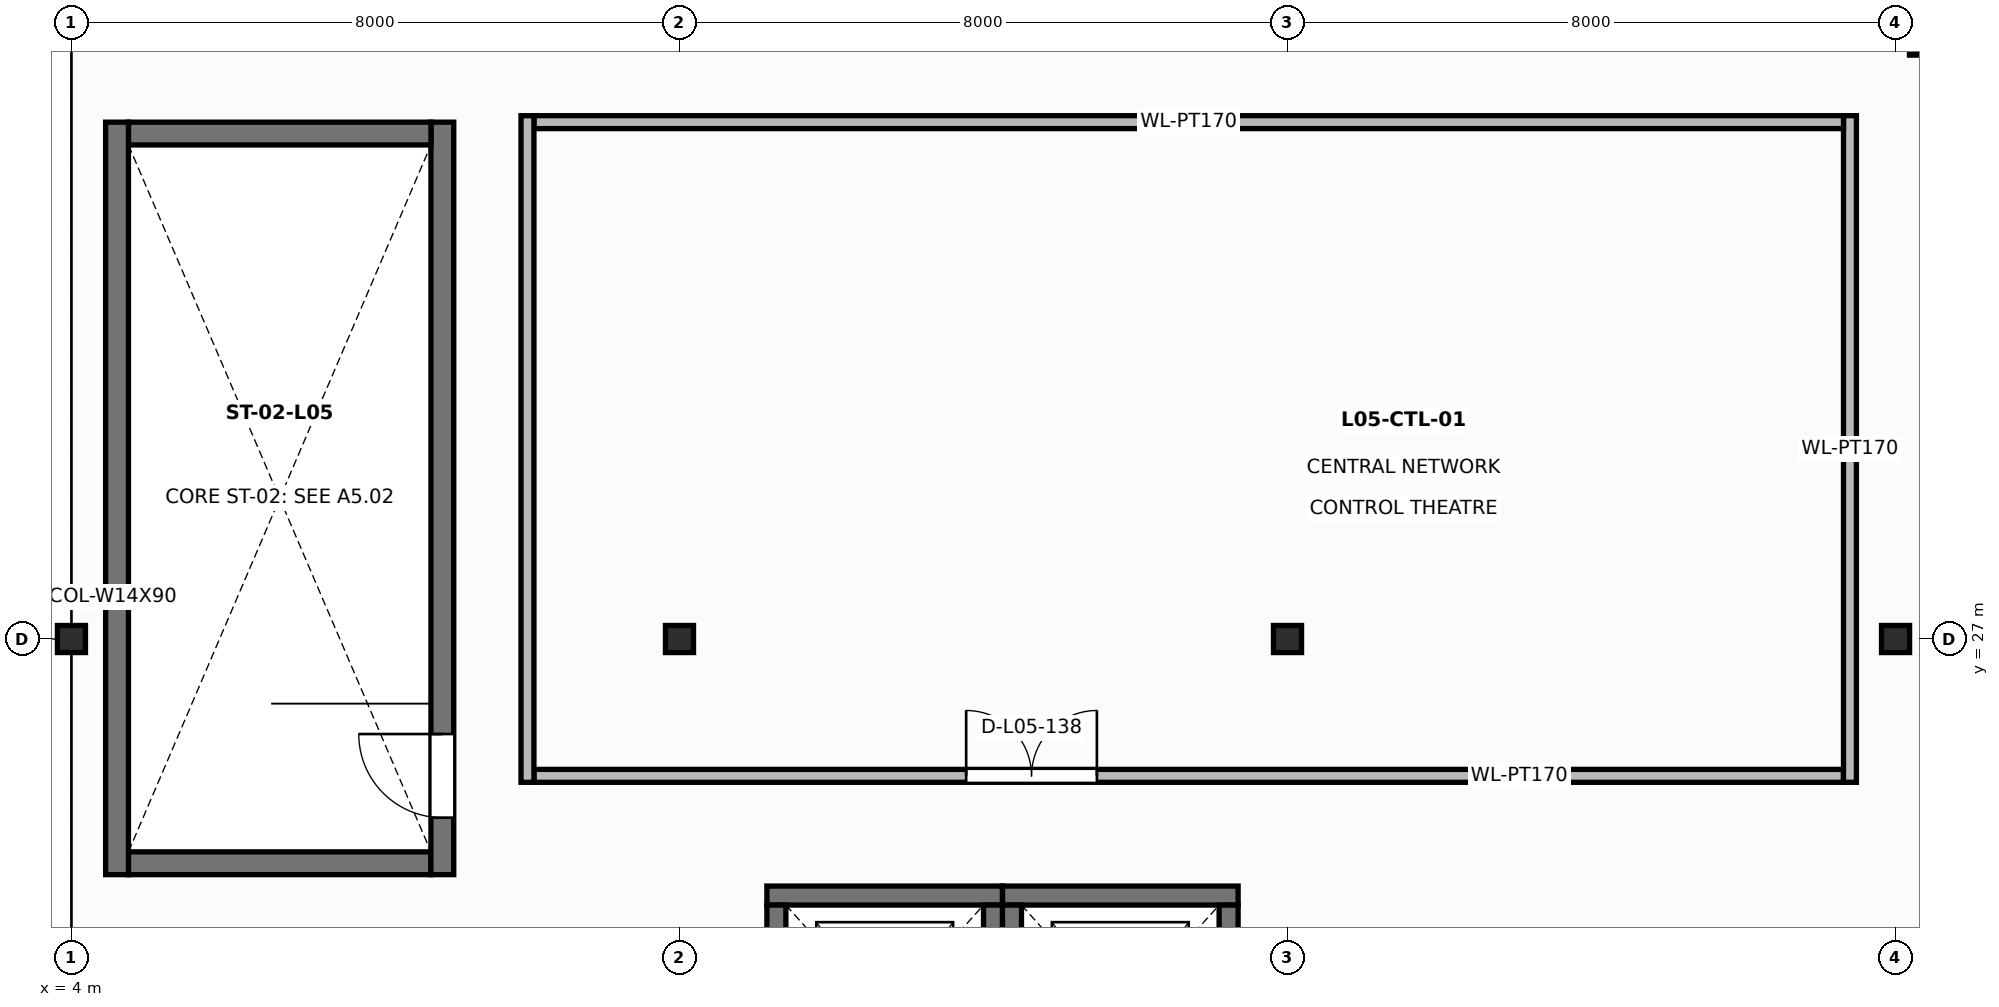
"""IFC4 building model, lengths in metres.
Left out: names, types, materials, properties, quantities, classifications, styles, units other than length and angle.
Written with IfcOpenShell. Run it as: python <this file> out.ifc"""

import sys

from ifc_helpers import new_model, si_unit, direction, frame, frame_2d, origin, origin_2d, place, context, subcontext, project, spatial, rectangle, i_section, extrude, element, fill, save


model = new_model("IFC4")
c1 = context("Model", 3, precision=1e-05, world=origin(), true_north=direction((0.0, 1.0)))
c2 = subcontext(c1, "Body", "Model", "MODEL_VIEW")
j1 = project(units=[si_unit("LENGTHUNIT", "METRE"), si_unit("PLANEANGLEUNIT", "RADIAN")], contexts=[c1])
p1 = place(None, origin())
s1 = spatial("IfcSite", under=j1, at=p1, CompositionType="ELEMENT")
p2 = place(p1, origin())
s2 = spatial("IfcBuilding", under=s1, at=p2, CompositionType="ELEMENT")
p3 = place(p2, frame((0.0, 0.0, 24.0)))
s3 = spatial("IfcBuildingStorey", under=s2, at=p3, CompositionType="ELEMENT", Elevation=24.0)
for number, where, z_axis, x_axis in (
    (1, (4.0, 27.0, 0.0), (0.0, 0.0, 1.0), (1.0, 0.0, 0.0)),
    (2, (12.0, 27.0, 0.0), (0.0, 0.0, 1.0), (1.0, 0.0, 0.0)),
    (3, (20.0, 27.0, 0.0), (0.0, 0.0, 1.0), (1.0, 0.0, 0.0)),
    (4, (28.0, 27.0, 0.0), (0.0, 0.0, 1.0), (1.0, 0.0, 0.0)),
):
    element("IfcColumn", number, at=place(p3, frame(where, z_axis=z_axis, x_axis=x_axis)), inside=s3, PredefinedType="COLUMN", context=c2, shape_type="SweptSolid", body=[
        extrude(i_section(OverallWidth=0.369, OverallDepth=0.356, WebThickness=0.011, FlangeThickness=0.018, at=origin_2d()), origin(), (0.0, 0.0, 1.0), 4.0),
    ])
p4 = place(p3, frame((4.75, 24.05, 0.0), z_axis=(0.0, 0.0, 1.0), x_axis=(1.0, 0.0, 0.0)))
e5 = element("IfcWall", 5, at=p4, inside=s3, PredefinedType="SHEAR", context=c2, shape_type="SweptSolid", body=[
    extrude(rectangle(XDim=3.98, YDim=0.3, at=frame_2d((1.99, 0.0))), origin(), (0.0, 0.0, 1.0), 3.6),
])
p5 = place(p3, frame((8.88, 23.9, 0.0), z_axis=(0.0, 0.0, 1.0), x_axis=(0.0, 1.0, 0.0)))
e6 = element("IfcWall", 6, at=p5, inside=s3, PredefinedType="SHEAR", context=c2, shape_type="SweptSolid", body=[
    extrude(rectangle(XDim=9.9, YDim=0.3, at=frame_2d((4.95, 0.0))), origin(), (0.0, 0.0, 1.0), 3.6),
])
p6 = place(p5, frame((0.75, 0.0, 0.0)))
e7 = element("IfcOpeningElement", 7, at=p6, cuts=e6, PredefinedType="OPENING", context=c2, shape_type="SweptSolid", body=[
    extrude(rectangle(XDim=1.1, YDim=2.15, at=frame_2d((0.55, 1.075))), frame((0.0, 0.16, 0.0), z_axis=(0.0, -1.0, 0.0), x_axis=(1.0, 0.0, 0.0)), (0.0, 0.0, 1.0), 0.32),
])
p7 = place(p3, frame((8.73, 33.65, 0.0), z_axis=(0.0, 0.0, 1.0), x_axis=(-1.0, 0.0, 0.0)))
e8 = element("IfcWall", 8, at=p7, inside=s3, PredefinedType="SHEAR", context=c2, shape_type="SweptSolid", body=[
    extrude(rectangle(XDim=3.98, YDim=0.3, at=frame_2d((1.99, 0.0))), origin(), (0.0, 0.0, 1.0), 3.6),
])
p8 = place(p3, frame((4.6, 33.8, 0.0), z_axis=(0.0, 0.0, 1.0), x_axis=(0.0, -1.0, 0.0)))
e9 = element("IfcWall", 9, at=p8, inside=s3, PredefinedType="SHEAR", context=c2, shape_type="SweptSolid", body=[
    extrude(rectangle(XDim=9.9, YDim=0.3, at=frame_2d((4.95, 0.0))), origin(), (0.0, 0.0, 1.0), 3.6),
])
p9 = place(p3, frame((16.25, 23.625, 0.0), z_axis=(0.0, 0.0, 1.0), x_axis=(-1.0, 0.0, 0.0)))
e10 = element("IfcWall", 10, at=p9, inside=s3, PredefinedType="SOLIDWALL", context=c2, shape_type="SweptSolid", body=[
    extrude(rectangle(XDim=3.1, YDim=0.25, at=frame_2d((1.55, 0.0))), origin(), (0.0, 0.0, 1.0), 3.35),
])
for number, where, z_axis, x_axis in (
    (11, (16.125, 20.6, 0.0), (0.0, 0.0, 1.0), (0.0, 1.0, 0.0)),
    (12, (13.275, 23.5, 0.0), (0.0, 0.0, 1.0), (0.0, -1.0, 0.0)),
):
    element("IfcWall", number, at=place(p3, frame(where, z_axis=z_axis, x_axis=x_axis)), inside=s3, PredefinedType="SOLIDWALL", context=c2, shape_type="SweptSolid", body=[
        extrude(rectangle(XDim=2.9, YDim=0.25, at=frame_2d((1.45, 0.0))), origin(), (0.0, 0.0, 1.0), 3.35),
    ])
p10 = place(p3, frame((19.35, 23.625, 0.0), z_axis=(0.0, 0.0, 1.0), x_axis=(-1.0, 0.0, 0.0)))
e13 = element("IfcWall", 13, at=p10, inside=s3, PredefinedType="SOLIDWALL", context=c2, shape_type="SweptSolid", body=[
    extrude(rectangle(XDim=3.1, YDim=0.25, at=frame_2d((1.55, 0.0))), origin(), (0.0, 0.0, 1.0), 3.35),
])
for number, where, z_axis, x_axis in (
    (14, (19.225, 20.6, 0.0), (0.0, 0.0, 1.0), (0.0, 1.0, 0.0)),
    (15, (16.375, 23.5, 0.0), (0.0, 0.0, 1.0), (0.0, -1.0, 0.0)),
):
    element("IfcWall", number, at=place(p3, frame(where, z_axis=z_axis, x_axis=x_axis)), inside=s3, PredefinedType="SOLIDWALL", context=c2, shape_type="SweptSolid", body=[
        extrude(rectangle(XDim=2.9, YDim=0.25, at=frame_2d((1.45, 0.0))), origin(), (0.0, 0.0, 1.0), 3.35),
    ])
p11 = place(p3, frame((10.085, 25.2, 0.0), z_axis=(0.0, 0.0, 1.0), x_axis=(1.0, 0.0, 0.0)))
e16 = element("IfcWall", 16, at=p11, inside=s3, PredefinedType="PARTITIONING", context=c2, shape_type="SweptSolid", body=[
    extrude(rectangle(XDim=17.23, YDim=0.17, at=frame_2d((8.615, 0.0))), origin(), (0.0, 0.0, 1.0), 3.6),
])
p12 = place(p11, frame((5.687, 0.0, 0.0)))
e17 = element("IfcOpeningElement", 17, at=p12, cuts=e16, PredefinedType="OPENING", context=c2, shape_type="SweptSolid", body=[
    extrude(rectangle(XDim=1.72, YDim=2.25, at=frame_2d((0.86, 1.125))), frame((0.0, 0.095, 0.0), z_axis=(0.0, -1.0, 0.0), x_axis=(1.0, 0.0, 0.0)), (0.0, 0.0, 1.0), 0.19),
])
p13 = place(p3, frame((27.4, 25.115, 0.0), z_axis=(0.0, 0.0, 1.0), x_axis=(0.0, 1.0, 0.0)))
e18 = element("IfcWall", 18, at=p13, inside=s3, PredefinedType="PARTITIONING", context=c2, shape_type="SweptSolid", body=[
    extrude(rectangle(XDim=8.77, YDim=0.17, at=frame_2d((4.385, 0.0))), origin(), (0.0, 0.0, 1.0), 3.6),
])
p14 = place(p3, frame((27.315, 33.8, 0.0), z_axis=(0.0, 0.0, 1.0), x_axis=(-1.0, 0.0, 0.0)))
e19 = element("IfcWall", 19, at=p14, inside=s3, PredefinedType="PARTITIONING", context=c2, shape_type="SweptSolid", body=[
    extrude(rectangle(XDim=17.23, YDim=0.17, at=frame_2d((8.615, 0.0))), origin(), (0.0, 0.0, 1.0), 3.6),
])
p15 = place(p3, frame((10.0, 33.885, 0.0), z_axis=(0.0, 0.0, 1.0), x_axis=(0.0, -1.0, 0.0)))
e20 = element("IfcWall", 20, at=p15, inside=s3, PredefinedType="PARTITIONING", context=c2, shape_type="SweptSolid", body=[
    extrude(rectangle(XDim=8.77, YDim=0.17, at=frame_2d((4.385, 0.0))), origin(), (0.0, 0.0, 1.0), 3.6),
])
p16 = place(p6, origin())
e21 = element("IfcDoor", 21, at=p16, inside=s3, OperationType="SINGLE_SWING_RIGHT", PredefinedType="DOOR", context=c2, shape_type="SweptSolid", body=[
    extrude(rectangle(XDim=1.1, YDim=2.15, at=frame_2d((0.55, 1.075))), frame((0.0, 0.025, 0.0), z_axis=(0.0, -1.0, 0.0), x_axis=(1.0, 0.0, 0.0)), (0.0, 0.0, 1.0), 0.05),
])
fill(e7, e21)
p17 = place(p12, origin())
e22 = element("IfcDoor", 22, at=p17, inside=s3, OperationType="DOUBLE_DOOR_SINGLE_SWING", PredefinedType="DOOR", context=c2, shape_type="SweptSolid", body=[
    extrude(rectangle(XDim=1.72, YDim=2.25, at=frame_2d((0.86, 1.125))), frame((0.0, 0.025, 0.0), z_axis=(0.0, -1.0, 0.0), x_axis=(1.0, 0.0, 0.0)), (0.0, 0.0, 1.0), 0.05),
])
fill(e17, e22)
save(model, sys.argv[1])
